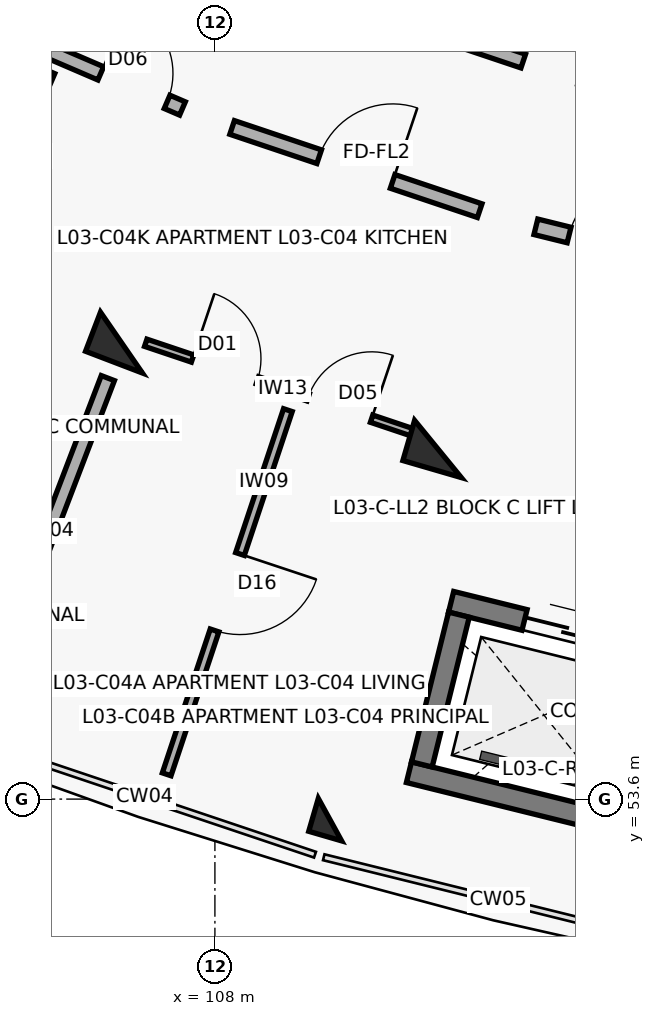
"""IFC4 building model, lengths in metres.
Left out: names, types, materials, properties, quantities, classifications, styles, units other than length and angle.
Written with IfcOpenShell. Run it as: python <this file> out.ifc"""

import sys

from ifc_helpers import new_model, si_unit, direction, frame, frame_2d, origin, origin_2d, place, context, subcontext, project, spatial, rectangle, extrude, element, fill, save


model = new_model("IFC4")
c1 = context("Model", 3, precision=1e-05, world=origin(), true_north=direction((0.0, 1.0)))
c2 = subcontext(c1, "Body", "Model", "MODEL_VIEW")
j1 = project(units=[si_unit("LENGTHUNIT", "METRE"), si_unit("PLANEANGLEUNIT", "RADIAN")], contexts=[c1])
p1 = place(None, origin())
s1 = spatial("IfcSite", under=j1, at=p1, CompositionType="ELEMENT")
p2 = place(p1, origin())
s2 = spatial("IfcBuilding", under=s1, at=p2, CompositionType="ELEMENT")
p3 = place(p2, frame((0.0, 0.0, 11.2)))
s3 = spatial("IfcBuildingStorey", under=s2, at=p3, CompositionType="ELEMENT", Elevation=11.2)
for number, where, z_axis, x_axis in (
    (1, (106.77, 59.606, 0.0), (0.0, 0.0, 1.0), (-0.357, -0.934, 0.0)),
    (2, (110.934, 58.207, 0.0), (0.0, 0.0, 1.0), (-0.28, -0.96, 0.0)),
):
    element("IfcColumn", number, at=place(p3, frame(where, z_axis=z_axis, x_axis=x_axis)), inside=s3, PredefinedType="COLUMN", context=c2, shape_type="SweptSolid", body=[
        extrude(rectangle(XDim=0.55, YDim=0.8, at=origin_2d()), origin(), (0.0, 0.0, 1.0), 3.1),
    ])
p4 = place(p3, frame((109.513, 53.329, 0.0), z_axis=(0.0, 0.0, 1.0), x_axis=(-0.27966144946, -0.96009867914, 0.0)))
e3 = element("IfcColumn", 3, at=p4, inside=s3, PredefinedType="COLUMN", context=c2, shape_type="SweptSolid", body=[
    extrude(rectangle(XDim=0.45, YDim=0.45, at=origin_2d()), origin(), (0.0, 0.0, 1.0), 3.1),
])
p5 = place(p3, frame((111.108, 56.196, 0.0), z_axis=(0.0, 0.0, 1.0), x_axis=(0.970706856107, -0.240266933861, 0.0)))
e4 = element("IfcWall", 4, at=p5, inside=s3, PredefinedType="SHEAR", context=c2, shape_type="SweptSolid", body=[
    extrude(rectangle(XDim=3.09, YDim=0.28, at=frame_2d((1.545, 0.0))), origin(), (0.0, 0.0, 1.0), 3.1),
])
p6 = place(p5, frame((0.995, 0.0, 0.0)))
e5 = element("IfcOpeningElement", 5, at=p6, cuts=e4, PredefinedType="OPENING", context=c2, shape_type="SweptSolid", body=[
    extrude(rectangle(XDim=1.1, YDim=2.15, at=frame_2d((0.55, 1.075))), frame((0.0, 0.15, 0.0), z_axis=(0.0, -1.0, 0.0), x_axis=(1.0, 0.0, 0.0)), (0.0, 0.0, 1.0), 0.3),
])
p7 = place(p3, frame((110.553, 53.954, 0.0), z_axis=(0.0, 0.0, 1.0), x_axis=(0.970725280816, -0.240192483614, 0.0)))
e6 = element("IfcWall", 6, at=p7, inside=s3, PredefinedType="SHEAR", context=c2, shape_type="SweptSolid", body=[
    extrude(rectangle(XDim=3.09, YDim=0.28, at=frame_2d((1.545, 0.0))), origin(), (0.0, 0.0, 1.0), 3.1),
])
p8 = place(p3, frame((111.21, 56.027, 0.0), z_axis=(0.0, 0.0, 1.0), x_axis=(-0.240186044774, -0.970726873995, 0.0)))
e7 = element("IfcWall", 7, at=p8, inside=s3, PredefinedType="SHEAR", context=c2, shape_type="SweptSolid", body=[
    extrude(rectangle(XDim=2.03, YDim=0.28, at=frame_2d((1.015, 0.0))), origin(), (0.0, 0.0, 1.0), 3.1),
])
p9 = place(p3, frame((104.417, 64.044, 0.0), z_axis=(0.0, 0.0, 1.0), x_axis=(0.918718172399, -0.394913813008, 0.0)))
e8 = element("IfcWall", 8, at=p9, inside=s3, PredefinedType="SOLIDWALL", context=c2, shape_type="SweptSolid", body=[
    extrude(rectangle(XDim=3.436, YDim=0.19, at=frame_2d((1.718, 0.0))), origin(), (0.0, 0.0, 1.0), 2.08),
])
p10 = place(p9, frame((0.28, 0.0, 0.0)))
e9 = element("IfcOpeningElement", 9, at=p10, cuts=e8, PredefinedType="OPENING", context=c2, shape_type="SweptSolid", body=[
    extrude(rectangle(XDim=1.12, YDim=2.15, at=frame_2d((0.56, 1.075))), frame((0.0, 0.105, 0.0), z_axis=(0.0, -1.0, 0.0), x_axis=(1.0, 0.0, 0.0)), (0.0, 0.0, 1.0), 0.21),
])
p11 = place(p9, frame((2.266, 0.0, 0.0)))
e10 = element("IfcOpeningElement", 10, at=p11, cuts=e8, PredefinedType="OPENING", context=c2, shape_type="SweptSolid", body=[
    extrude(rectangle(XDim=0.95, YDim=2.1, at=frame_2d((0.475, 1.05))), frame((0.0, 0.105, 0.0), z_axis=(0.0, -1.0, 0.0), x_axis=(1.0, 0.0, 0.0)), (0.0, 0.0, 1.0), 0.21),
])
p12 = place(p3, frame((105.829, 63.173, 0.0), z_axis=(0.0, 0.0, 1.0), x_axis=(-0.396278945437, -0.91813016365, 0.0)))
e11 = element("IfcWall", 11, at=p12, inside=s3, PredefinedType="PARTITIONING", context=c2, shape_type="SweptSolid", body=[
    extrude(rectangle(XDim=7.95, YDim=0.14, at=frame_2d((3.975, 0.0))), origin(), (0.0, 0.0, 1.0), 2.08),
])
p13 = place(p12, frame((6.05, 0.0, 0.0)))
e12 = element("IfcOpeningElement", 12, at=p13, cuts=e11, PredefinedType="OPENING", context=c2, shape_type="SweptSolid", body=[
    extrude(rectangle(XDim=0.92, YDim=2.1, at=frame_2d((0.46, 1.05))), frame((0.0, 0.08, 0.0), z_axis=(0.0, -1.0, 0.0), x_axis=(1.0, 0.0, 0.0)), (0.0, 0.0, 1.0), 0.16),
])
p14 = place(p3, frame((108.227, 62.437, 0.0), z_axis=(0.0, 0.0, 1.0), x_axis=(0.947884468821, -0.318614239745, 0.0)))
e13 = element("IfcWall", 13, at=p14, inside=s3, PredefinedType="SOLIDWALL", context=c2, shape_type="SweptSolid", body=[
    extrude(rectangle(XDim=3.436, YDim=0.19, at=frame_2d((1.718, 0.0))), origin(), (0.0, 0.0, 1.0), 2.08),
])
p15 = place(p14, frame((1.208, 0.0, 0.0)))
e14 = element("IfcOpeningElement", 14, at=p15, cuts=e13, PredefinedType="OPENING", context=c2, shape_type="SweptSolid", body=[
    extrude(rectangle(XDim=1.02, YDim=2.15, at=frame_2d((0.51, 1.075))), frame((0.0, 0.105, 0.0), z_axis=(0.0, -1.0, 0.0), x_axis=(1.0, 0.0, 0.0)), (0.0, 0.0, 1.0), 0.21),
])
p16 = place(p3, frame((108.958, 64.352, 0.0), z_axis=(0.0, 0.0, 1.0), x_axis=(0.94787351033, -0.318646839643, 0.0)))
e15 = element("IfcWall", 15, at=p16, inside=s3, PredefinedType="SOLIDWALL", context=c2, shape_type="SweptSolid", body=[
    extrude(rectangle(XDim=3.269, YDim=0.19, at=frame_2d((1.634, 0.0))), origin(), (0.0, 0.0, 1.0), 2.08),
])
p17 = place(p16, frame((1.174, 0.0, 0.0)))
e16 = element("IfcOpeningElement", 16, at=p17, cuts=e15, PredefinedType="OPENING", context=c2, shape_type="SweptSolid", body=[
    extrude(rectangle(XDim=0.92, YDim=2.1, at=frame_2d((0.46, 1.05))), frame((0.0, 0.105, 0.0), z_axis=(0.0, -1.0, 0.0), x_axis=(1.0, 0.0, 0.0)), (0.0, 0.0, 1.0), 0.21),
])
p18 = place(p3, frame((107.09, 59.604, 0.0), z_axis=(0.0, 0.0, 1.0), x_axis=(0.947873924847, -0.318645606584, 0.0)))
e17 = element("IfcWall", 17, at=p18, inside=s3, PredefinedType="PARTITIONING", context=c2, shape_type="SweptSolid", body=[
    extrude(rectangle(XDim=3.785, YDim=0.1, at=frame_2d((1.893, 0.0))), origin(), (0.0, 0.0, 1.0), 2.08),
])
p19 = place(p18, frame((0.65, 0.0, 0.0)))
e18 = element("IfcOpeningElement", 18, at=p19, cuts=e17, PredefinedType="OPENING", context=c2, shape_type="SweptSolid", body=[
    extrude(rectangle(XDim=0.9, YDim=2.1, at=frame_2d((0.45, 1.05))), frame((0.0, 0.06, 0.0), z_axis=(0.0, -1.0, 0.0), x_axis=(1.0, 0.0, 0.0)), (0.0, 0.0, 1.0), 0.12),
])
p20 = place(p18, frame((2.255, 0.0, 0.0)))
e19 = element("IfcOpeningElement", 19, at=p20, cuts=e17, PredefinedType="OPENING", context=c2, shape_type="SweptSolid", body=[
    extrude(rectangle(XDim=0.88, YDim=2.1, at=frame_2d((0.44, 1.05))), frame((0.0, 0.06, 0.0), z_axis=(0.0, -1.0, 0.0), x_axis=(1.0, 0.0, 0.0)), (0.0, 0.0, 1.0), 0.12),
])
p21 = place(p3, frame((108.96, 58.718, 0.0), z_axis=(0.0, 0.0, 1.0), x_axis=(-0.315778138239, -0.948833055606, 0.0)))
e20 = element("IfcWall", 20, at=p21, inside=s3, PredefinedType="PARTITIONING", context=c2, shape_type="SweptSolid", body=[
    extrude(rectangle(XDim=5.05, YDim=0.12, at=frame_2d((2.525, 0.0))), origin(), (0.0, 0.0, 1.0), 2.08),
])
p22 = place(p21, frame((1.995, 0.0, 0.0)))
e21 = element("IfcOpeningElement", 21, at=p22, cuts=e20, PredefinedType="OPENING", context=c2, shape_type="SweptSolid", body=[
    extrude(rectangle(XDim=1.06, YDim=2.1, at=frame_2d((0.53, 1.05))), frame((0.0, 0.07, 0.0), z_axis=(0.0, -1.0, 0.0), x_axis=(1.0, 0.0, 0.0)), (0.0, 0.0, 1.0), 0.14),
])
p23 = place(p3, frame((106.591, 59.139, 0.0), z_axis=(0.0, 0.0, 1.0), x_axis=(-0.357064016205, -0.934079915388, 0.0)))
e22 = element("IfcWall", 22, at=p23, inside=s3, PredefinedType="SOLIDWALL", context=c2, shape_type="SweptSolid", body=[
    extrude(rectangle(XDim=4.35, YDim=0.185, at=frame_2d((2.175, 0.0))), origin(), (0.0, 0.0, 1.0), 2.08),
])
p24 = place(p3, frame((112.223, 61.13, 0.0), z_axis=(0.0, 0.0, 1.0), x_axis=(0.970719238682, -0.240216901263, 0.0)))
e23 = element("IfcWall", 23, at=p24, inside=s3, PredefinedType="SOLIDWALL", context=c2, shape_type="SweptSolid", body=[
    extrude(rectangle(XDim=3.296, YDim=0.21, at=frame_2d((1.648, 0.0))), origin(), (0.0, 0.0, 1.0), 2.08),
])
p25 = place(p24, frame((0.45, 0.0, 0.0)))
e24 = element("IfcOpeningElement", 24, at=p25, cuts=e23, PredefinedType="OPENING", context=c2, shape_type="SweptSolid", body=[
    extrude(rectangle(XDim=1.1, YDim=2.15, at=frame_2d((0.55, 1.075))), frame((0.0, 0.115, 0.0), z_axis=(0.0, -1.0, 0.0), x_axis=(1.0, 0.0, 0.0)), (0.0, 0.0, 1.0), 0.23),
])
p26 = place(p24, frame((1.726, 0.0, 0.0)))
e25 = element("IfcOpeningElement", 25, at=p26, cuts=e23, PredefinedType="OPENING", context=c2, shape_type="SweptSolid", body=[
    extrude(rectangle(XDim=1.12, YDim=2.15, at=frame_2d((0.56, 1.075))), frame((0.0, 0.115, 0.0), z_axis=(0.0, -1.0, 0.0), x_axis=(1.0, 0.0, 0.0)), (0.0, 0.0, 1.0), 0.23),
])
p27 = place(p6, origin())
e26 = element("IfcDoor", 26, at=p27, inside=s3, OperationType="DOUBLE_DOOR_SLIDING", PredefinedType="DOOR", context=c2, shape_type="SweptSolid", body=[
    extrude(rectangle(XDim=1.1, YDim=2.15, at=frame_2d((0.55, 1.075))), frame((0.0, 0.025, 0.0), z_axis=(0.0, -1.0, 0.0), x_axis=(1.0, 0.0, 0.0)), (0.0, 0.0, 1.0), 0.05),
])
fill(e5, e26)
p28 = place(p11, origin())
e27 = element("IfcDoor", 27, at=p28, inside=s3, OperationType="SINGLE_SWING_LEFT", PredefinedType="DOOR", context=c2, shape_type="SweptSolid", body=[
    extrude(rectangle(XDim=0.95, YDim=2.1, at=frame_2d((0.475, 1.05))), frame((0.0, 0.025, 0.0), z_axis=(0.0, -1.0, 0.0), x_axis=(1.0, 0.0, 0.0)), (0.0, 0.0, 1.0), 0.05),
])
fill(e10, e27)
p29 = place(p15, origin())
e28 = element("IfcDoor", 28, at=p29, inside=s3, OperationType="SINGLE_SWING_RIGHT", PredefinedType="DOOR", context=c2, shape_type="SweptSolid", body=[
    extrude(rectangle(XDim=1.02, YDim=2.15, at=frame_2d((0.51, 1.075))), frame((0.0, 0.025, 0.0), z_axis=(0.0, -1.0, 0.0), x_axis=(1.0, 0.0, 0.0)), (0.0, 0.0, 1.0), 0.05),
])
fill(e14, e28)
p30 = place(p19, origin())
e29 = element("IfcDoor", 29, at=p30, inside=s3, OperationType="SINGLE_SWING_LEFT", PredefinedType="DOOR", context=c2, shape_type="SweptSolid", body=[
    extrude(rectangle(XDim=0.9, YDim=2.1, at=frame_2d((0.45, 1.05))), frame((0.0, 0.025, 0.0), z_axis=(0.0, -1.0, 0.0), x_axis=(1.0, 0.0, 0.0)), (0.0, 0.0, 1.0), 0.05),
])
fill(e18, e29)
p31 = place(p20, origin())
e30 = element("IfcDoor", 30, at=p31, inside=s3, OperationType="SINGLE_SWING_RIGHT", PredefinedType="DOOR", context=c2, shape_type="SweptSolid", body=[
    extrude(rectangle(XDim=0.88, YDim=2.1, at=frame_2d((0.44, 1.05))), frame((0.0, 0.025, 0.0), z_axis=(0.0, -1.0, 0.0), x_axis=(1.0, 0.0, 0.0)), (0.0, 0.0, 1.0), 0.05),
])
fill(e19, e30)
p32 = place(p22, origin())
e31 = element("IfcDoor", 31, at=p32, inside=s3, OperationType="SINGLE_SWING_LEFT", PredefinedType="DOOR", context=c2, shape_type="SweptSolid", body=[
    extrude(rectangle(XDim=1.06, YDim=2.1, at=frame_2d((0.53, 1.05))), frame((0.0, 0.025, 0.0), z_axis=(0.0, -1.0, 0.0), x_axis=(1.0, 0.0, 0.0)), (0.0, 0.0, 1.0), 0.05),
])
fill(e21, e31)
p33 = place(p25, origin())
e32 = element("IfcDoor", 32, at=p33, inside=s3, OperationType="SINGLE_SWING_RIGHT", PredefinedType="DOOR", context=c2, shape_type="SweptSolid", body=[
    extrude(rectangle(XDim=1.1, YDim=2.15, at=frame_2d((0.55, 1.075))), frame((0.0, 0.025, 0.0), z_axis=(0.0, -1.0, 0.0), x_axis=(1.0, 0.0, 0.0)), (0.0, 0.0, 1.0), 0.05),
])
fill(e24, e32)
save(model, sys.argv[1])
